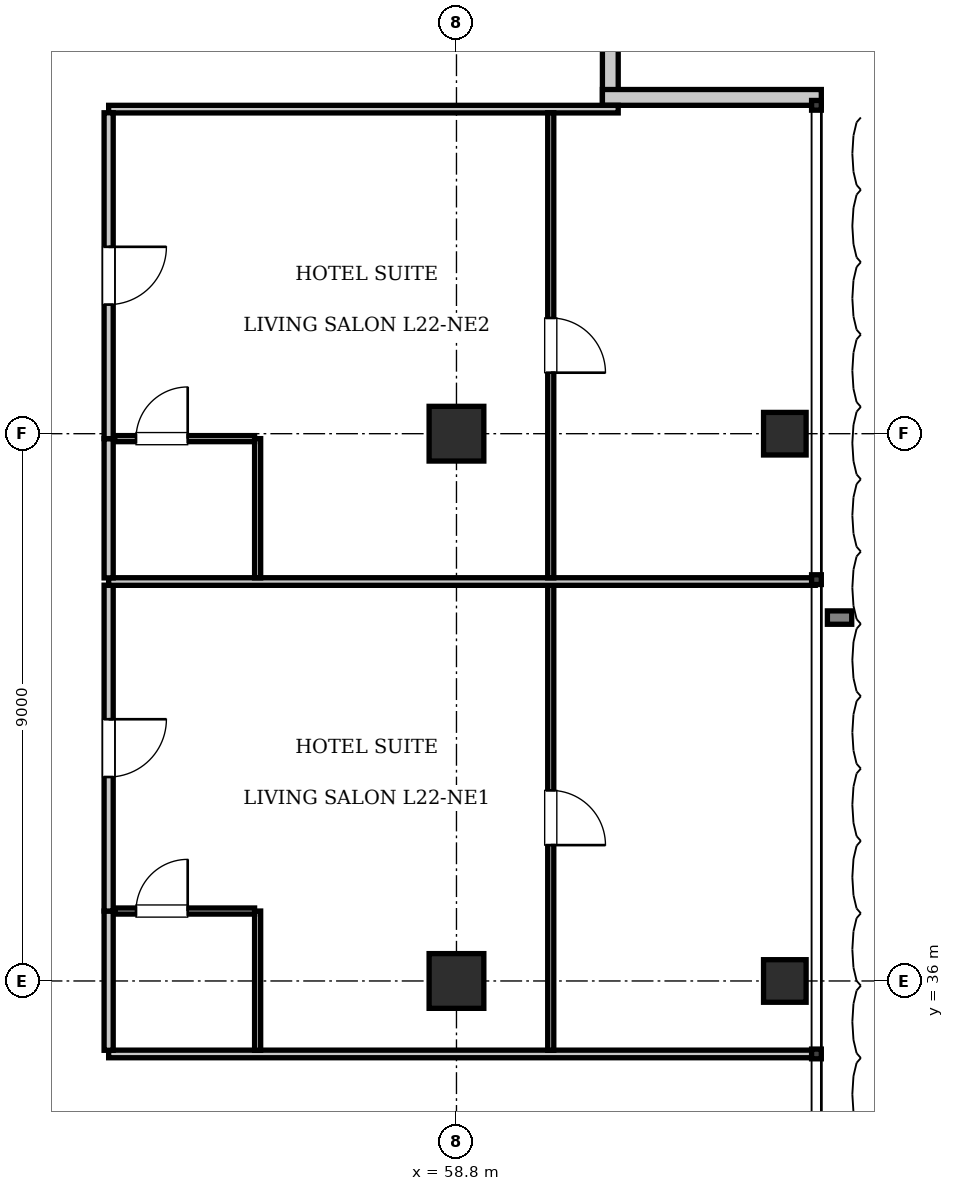
"""IFC4 building model, lengths in metres.
Left out: names, types, materials, properties, quantities, classifications, styles, units other than length and angle.
Written with IfcOpenShell. Run it as: python <this file> out.ifc"""

import sys

from ifc_helpers import new_model, si_unit, direction, frame, frame_2d, origin, origin_2d, place, context, subcontext, project, spatial, rectangle, i_section, extrude, element, fill, save


model = new_model("IFC4")
c1 = context("Model", 3, precision=1e-05, world=origin(), true_north=direction((0.0, 1.0)))
c2 = subcontext(c1, "Body", "Model", "MODEL_VIEW")
j1 = project(units=[si_unit("LENGTHUNIT", "METRE"), si_unit("PLANEANGLEUNIT", "RADIAN")], contexts=[c1])
p1 = place(None, origin())
s1 = spatial("IfcSite", under=j1, at=p1, CompositionType="ELEMENT")
p2 = place(p1, origin())
s2 = spatial("IfcBuilding", under=s1, at=p2, CompositionType="ELEMENT")
p3 = place(p2, frame((0.0, 0.0, 92.4)))
s3 = spatial("IfcBuildingStorey", under=s2, at=p3, CompositionType="ELEMENT", Elevation=92.4)
for number, where, z_axis, x_axis in (
    (1, (58.8, 36.0, 0.0), (0.0, 0.0, 1.0), (1.0, 0.0, 0.0)),
    (2, (58.8, 45.0, 0.0), (0.0, 0.0, 1.0), (1.0, 0.0, 0.0)),
):
    element("IfcColumn", number, at=place(p3, frame(where, z_axis=z_axis, x_axis=x_axis)), inside=s3, PredefinedType="COLUMN", context=c2, shape_type="SweptSolid", body=[
        extrude(rectangle(XDim=0.9, YDim=0.9, at=origin_2d()), origin(), (0.0, 0.0, 1.0), 3.85),
    ])
for number, where, z_axis, x_axis in (
    (3, (64.2, 36.0, 0.0), (0.0, 0.0, 1.0), (1.0, 0.0, 0.0)),
    (4, (64.2, 45.0, 0.0), (0.0, 0.0, 1.0), (1.0, 0.0, 0.0)),
):
    element("IfcColumn", number, at=place(p3, frame(where, z_axis=z_axis, x_axis=x_axis)), inside=s3, PredefinedType="COLUMN", context=c2, shape_type="SweptSolid", body=[
        extrude(i_section(OverallWidth=0.7, OverallDepth=0.7, WebThickness=0.028, FlangeThickness=0.044, at=origin_2d()), origin(), (0.0, 0.0, 1.0), 3.85),
    ])
for number, where, z_axis, x_axis in (
    (5, (61.33, 54.0, 0.0), (0.0, 0.0, 1.0), (0.0, -1.0, 0.0)),
    (6, (61.2, 50.53, 0.0), (0.0, 0.0, 1.0), (1.0, 0.0, 0.0)),
):
    element("IfcWall", number, at=place(p3, frame(where, z_axis=z_axis, x_axis=x_axis)), inside=s3, PredefinedType="SOLIDWALL", context=c2, shape_type="SweptSolid", body=[
        extrude(rectangle(XDim=3.6, YDim=0.26, at=frame_2d((1.8, 0.0))), origin(), (0.0, 0.0, 1.0), 3.61),
    ])
p4 = place(p3, frame((53.08, 34.8, 0.0), z_axis=(0.0, 0.0, 1.0), x_axis=(1.0, 0.0, 0.0)))
e7 = element("IfcWall", 7, at=p4, inside=s3, PredefinedType="PARTITIONING", context=c2, shape_type="SweptSolid", body=[
    extrude(rectangle(XDim=11.62, YDim=0.125, at=frame_2d((5.81, 0.0))), origin(), (0.0, 0.0, 1.0), 3.61),
])
p5 = place(p3, frame((53.08, 50.337, 0.0), z_axis=(0.0, 0.0, 1.0), x_axis=(1.0, 0.0, 0.0)))
e8 = element("IfcWall", 8, at=p5, inside=s3, PredefinedType="PARTITIONING", context=c2, shape_type="SweptSolid", body=[
    extrude(rectangle(XDim=8.38, YDim=0.125, at=frame_2d((4.19, 0.0))), origin(), (0.0, 0.0, 1.0), 3.61),
])
p6 = place(p3, frame((53.08, 34.86, 0.0), z_axis=(0.0, 0.0, 1.0), x_axis=(0.0, 1.0, 0.0)))
e9 = element("IfcWall", 9, at=p6, inside=s3, PredefinedType="PARTITIONING", context=c2, shape_type="SweptSolid", body=[
    extrude(rectangle(XDim=2.29, YDim=0.15, at=frame_2d((1.145, 0.0))), origin(), (0.0, 0.0, 1.0), 3.61),
])
p7 = place(p3, frame((53.08, 37.15, 0.0), z_axis=(0.0, 0.0, 1.0), x_axis=(0.0, 1.0, 0.0)))
e10 = element("IfcWall", 10, at=p7, inside=s3, PredefinedType="PARTITIONING", context=c2, shape_type="SweptSolid", body=[
    extrude(rectangle(XDim=5.359, YDim=0.15, at=frame_2d((2.679, 0.0))), origin(), (0.0, 0.0, 1.0), 3.61),
])
p8 = place(p7, frame((2.204, 0.0, 0.0)))
e11 = element("IfcOpeningElement", 11, at=p8, cuts=e10, PredefinedType="OPENING", context=c2, shape_type="SweptSolid", body=[
    extrude(rectangle(XDim=0.95, YDim=2.15, at=frame_2d((0.475, 1.075))), frame((0.0, 0.085, 0.0), z_axis=(0.0, -1.0, 0.0), x_axis=(1.0, 0.0, 0.0)), (0.0, 0.0, 1.0), 0.17),
])
p9 = place(p3, frame((55.53, 34.86, 0.0), z_axis=(0.0, 0.0, 1.0), x_axis=(0.0, 1.0, 0.0)))
e12 = element("IfcWall", 12, at=p9, inside=s3, PredefinedType="PARTITIONING", context=c2, shape_type="SweptSolid", body=[
    extrude(rectangle(XDim=2.29, YDim=0.1, at=frame_2d((1.145, 0.0))), origin(), (0.0, 0.0, 1.0), 3.61),
])
p10 = place(p3, frame((53.18, 37.15, 0.0), z_axis=(0.0, 0.0, 1.0), x_axis=(1.0, 0.0, 0.0)))
e13 = element("IfcWall", 13, at=p10, inside=s3, PredefinedType="PARTITIONING", context=c2, shape_type="SweptSolid", body=[
    extrude(rectangle(XDim=2.3, YDim=0.1, at=frame_2d((1.15, 0.0))), origin(), (0.0, 0.0, 1.0), 3.61),
])
p11 = place(p10, frame((0.35, 0.0, 0.0)))
e14 = element("IfcOpeningElement", 14, at=p11, cuts=e13, PredefinedType="OPENING", context=c2, shape_type="SweptSolid", body=[
    extrude(rectangle(XDim=0.85, YDim=2.1, at=frame_2d((0.425, 1.05))), frame((0.0, 0.06, 0.0), z_axis=(0.0, -1.0, 0.0), x_axis=(1.0, 0.0, 0.0)), (0.0, 0.0, 1.0), 0.12),
])
p12 = place(p3, frame((60.35, 34.86, 0.0), z_axis=(0.0, 0.0, 1.0), x_axis=(0.0, 1.0, 0.0)))
e15 = element("IfcWall", 15, at=p12, inside=s3, PredefinedType="PARTITIONING", context=c2, shape_type="SweptSolid", body=[
    extrude(rectangle(XDim=7.649, YDim=0.1, at=frame_2d((3.824, 0.0))), origin(), (0.0, 0.0, 1.0), 3.61),
])
p13 = place(p12, frame((3.374, 0.0, 0.0)))
e16 = element("IfcOpeningElement", 16, at=p13, cuts=e15, PredefinedType="OPENING", context=c2, shape_type="SweptSolid", body=[
    extrude(rectangle(XDim=0.9, YDim=2.1, at=frame_2d((0.45, 1.05))), frame((0.0, 0.06, 0.0), z_axis=(0.0, -1.0, 0.0), x_axis=(1.0, 0.0, 0.0)), (0.0, 0.0, 1.0), 0.12),
])
p14 = place(p3, frame((53.08, 42.569, 0.0), z_axis=(0.0, 0.0, 1.0), x_axis=(1.0, 0.0, 0.0)))
e17 = element("IfcWall", 17, at=p14, inside=s3, PredefinedType="PARTITIONING", context=c2, shape_type="SweptSolid", body=[
    extrude(rectangle(XDim=11.62, YDim=0.125, at=frame_2d((5.81, 0.0))), origin(), (0.0, 0.0, 1.0), 3.61),
])
p15 = place(p3, frame((53.08, 42.629, 0.0), z_axis=(0.0, 0.0, 1.0), x_axis=(0.0, 1.0, 0.0)))
e18 = element("IfcWall", 18, at=p15, inside=s3, PredefinedType="PARTITIONING", context=c2, shape_type="SweptSolid", body=[
    extrude(rectangle(XDim=2.29, YDim=0.15, at=frame_2d((1.145, 0.0))), origin(), (0.0, 0.0, 1.0), 3.61),
])
p16 = place(p3, frame((53.08, 44.919, 0.0), z_axis=(0.0, 0.0, 1.0), x_axis=(0.0, 1.0, 0.0)))
e19 = element("IfcWall", 19, at=p16, inside=s3, PredefinedType="PARTITIONING", context=c2, shape_type="SweptSolid", body=[
    extrude(rectangle(XDim=5.359, YDim=0.15, at=frame_2d((2.679, 0.0))), origin(), (0.0, 0.0, 1.0), 3.61),
])
p17 = place(p16, frame((2.204, 0.0, 0.0)))
e20 = element("IfcOpeningElement", 20, at=p17, cuts=e19, PredefinedType="OPENING", context=c2, shape_type="SweptSolid", body=[
    extrude(rectangle(XDim=0.95, YDim=2.15, at=frame_2d((0.475, 1.075))), frame((0.0, 0.085, 0.0), z_axis=(0.0, -1.0, 0.0), x_axis=(1.0, 0.0, 0.0)), (0.0, 0.0, 1.0), 0.17),
])
p18 = place(p3, frame((55.53, 42.629, 0.0), z_axis=(0.0, 0.0, 1.0), x_axis=(0.0, 1.0, 0.0)))
e21 = element("IfcWall", 21, at=p18, inside=s3, PredefinedType="PARTITIONING", context=c2, shape_type="SweptSolid", body=[
    extrude(rectangle(XDim=2.29, YDim=0.1, at=frame_2d((1.145, 0.0))), origin(), (0.0, 0.0, 1.0), 3.61),
])
p19 = place(p3, frame((53.18, 44.919, 0.0), z_axis=(0.0, 0.0, 1.0), x_axis=(1.0, 0.0, 0.0)))
e22 = element("IfcWall", 22, at=p19, inside=s3, PredefinedType="PARTITIONING", context=c2, shape_type="SweptSolid", body=[
    extrude(rectangle(XDim=2.3, YDim=0.1, at=frame_2d((1.15, 0.0))), origin(), (0.0, 0.0, 1.0), 2.999),
])
p20 = place(p19, frame((0.35, 0.0, 0.0)))
e23 = element("IfcOpeningElement", 23, at=p20, cuts=e22, PredefinedType="OPENING", context=c2, shape_type="SweptSolid", body=[
    extrude(rectangle(XDim=0.85, YDim=2.1, at=frame_2d((0.425, 1.05))), frame((0.0, 0.06, 0.0), z_axis=(0.0, -1.0, 0.0), x_axis=(1.0, 0.0, 0.0)), (0.0, 0.0, 1.0), 0.12),
])
p21 = place(p3, frame((60.35, 42.629, 0.0), z_axis=(0.0, 0.0, 1.0), x_axis=(0.0, 1.0, 0.0)))
e24 = element("IfcWall", 24, at=p21, inside=s3, PredefinedType="PARTITIONING", context=c2, shape_type="SweptSolid", body=[
    extrude(rectangle(XDim=7.649, YDim=0.1, at=frame_2d((3.824, 0.0))), origin(), (0.0, 0.0, 1.0), 3.61),
])
p22 = place(p21, frame((3.375, 0.0, 0.0)))
e25 = element("IfcOpeningElement", 25, at=p22, cuts=e24, PredefinedType="OPENING", context=c2, shape_type="SweptSolid", body=[
    extrude(rectangle(XDim=0.9, YDim=2.1, at=frame_2d((0.45, 1.05))), frame((0.0, 0.06, 0.0), z_axis=(0.0, -1.0, 0.0), x_axis=(1.0, 0.0, 0.0)), (0.0, 0.0, 1.0), 0.12),
])
p23 = place(p11, origin())
e26 = element("IfcDoor", 26, at=p23, inside=s3, OperationType="SINGLE_SWING_RIGHT", PredefinedType="DOOR", context=c2, shape_type="SweptSolid", body=[
    extrude(rectangle(XDim=0.85, YDim=2.1, at=frame_2d((0.425, 1.05))), frame((0.0, 0.025, 0.0), z_axis=(0.0, -1.0, 0.0), x_axis=(1.0, 0.0, 0.0)), (0.0, 0.0, 1.0), 0.05),
])
fill(e14, e26)
p24 = place(p8, frame((0.95, 0.0, 0.0), z_axis=(0.0, 0.0, 1.0), x_axis=(-1.0, 0.0, 0.0)))
e27 = element("IfcDoor", 27, at=p24, inside=s3, OperationType="SINGLE_SWING_LEFT", PredefinedType="DOOR", context=c2, shape_type="SweptSolid", body=[
    extrude(rectangle(XDim=0.95, YDim=2.15, at=frame_2d((0.475, 1.075))), frame((0.0, 0.025, 0.0), z_axis=(0.0, -1.0, 0.0), x_axis=(1.0, 0.0, 0.0)), (0.0, 0.0, 1.0), 0.05),
])
fill(e11, e27)
p25 = place(p13, frame((0.9, 0.0, 0.0), z_axis=(0.0, 0.0, 1.0), x_axis=(-1.0, 0.0, 0.0)))
e28 = element("IfcDoor", 28, at=p25, inside=s3, OperationType="SINGLE_SWING_RIGHT", PredefinedType="DOOR", context=c2, shape_type="SweptSolid", body=[
    extrude(rectangle(XDim=0.9, YDim=2.1, at=frame_2d((0.45, 1.05))), frame((0.0, 0.025, 0.0), z_axis=(0.0, -1.0, 0.0), x_axis=(1.0, 0.0, 0.0)), (0.0, 0.0, 1.0), 0.05),
])
fill(e16, e28)
p26 = place(p20, origin())
e29 = element("IfcDoor", 29, at=p26, inside=s3, OperationType="SINGLE_SWING_RIGHT", PredefinedType="DOOR", context=c2, shape_type="SweptSolid", body=[
    extrude(rectangle(XDim=0.85, YDim=2.1, at=frame_2d((0.425, 1.05))), frame((0.0, 0.025, 0.0), z_axis=(0.0, -1.0, 0.0), x_axis=(1.0, 0.0, 0.0)), (0.0, 0.0, 1.0), 0.05),
])
fill(e23, e29)
p27 = place(p17, frame((0.95, 0.0, 0.0), z_axis=(0.0, 0.0, 1.0), x_axis=(-1.0, 0.0, 0.0)))
e30 = element("IfcDoor", 30, at=p27, inside=s3, OperationType="SINGLE_SWING_LEFT", PredefinedType="DOOR", context=c2, shape_type="SweptSolid", body=[
    extrude(rectangle(XDim=0.95, YDim=2.15, at=frame_2d((0.475, 1.075))), frame((0.0, 0.025, 0.0), z_axis=(0.0, -1.0, 0.0), x_axis=(1.0, 0.0, 0.0)), (0.0, 0.0, 1.0), 0.05),
])
fill(e20, e30)
p28 = place(p22, frame((0.9, 0.0, 0.0), z_axis=(0.0, 0.0, 1.0), x_axis=(-1.0, 0.0, 0.0)))
e31 = element("IfcDoor", 31, at=p28, inside=s3, OperationType="SINGLE_SWING_RIGHT", PredefinedType="DOOR", context=c2, shape_type="SweptSolid", body=[
    extrude(rectangle(XDim=0.9, YDim=2.1, at=frame_2d((0.45, 1.05))), frame((0.0, 0.025, 0.0), z_axis=(0.0, -1.0, 0.0), x_axis=(1.0, 0.0, 0.0)), (0.0, 0.0, 1.0), 0.05),
])
fill(e25, e31)
save(model, sys.argv[1])
